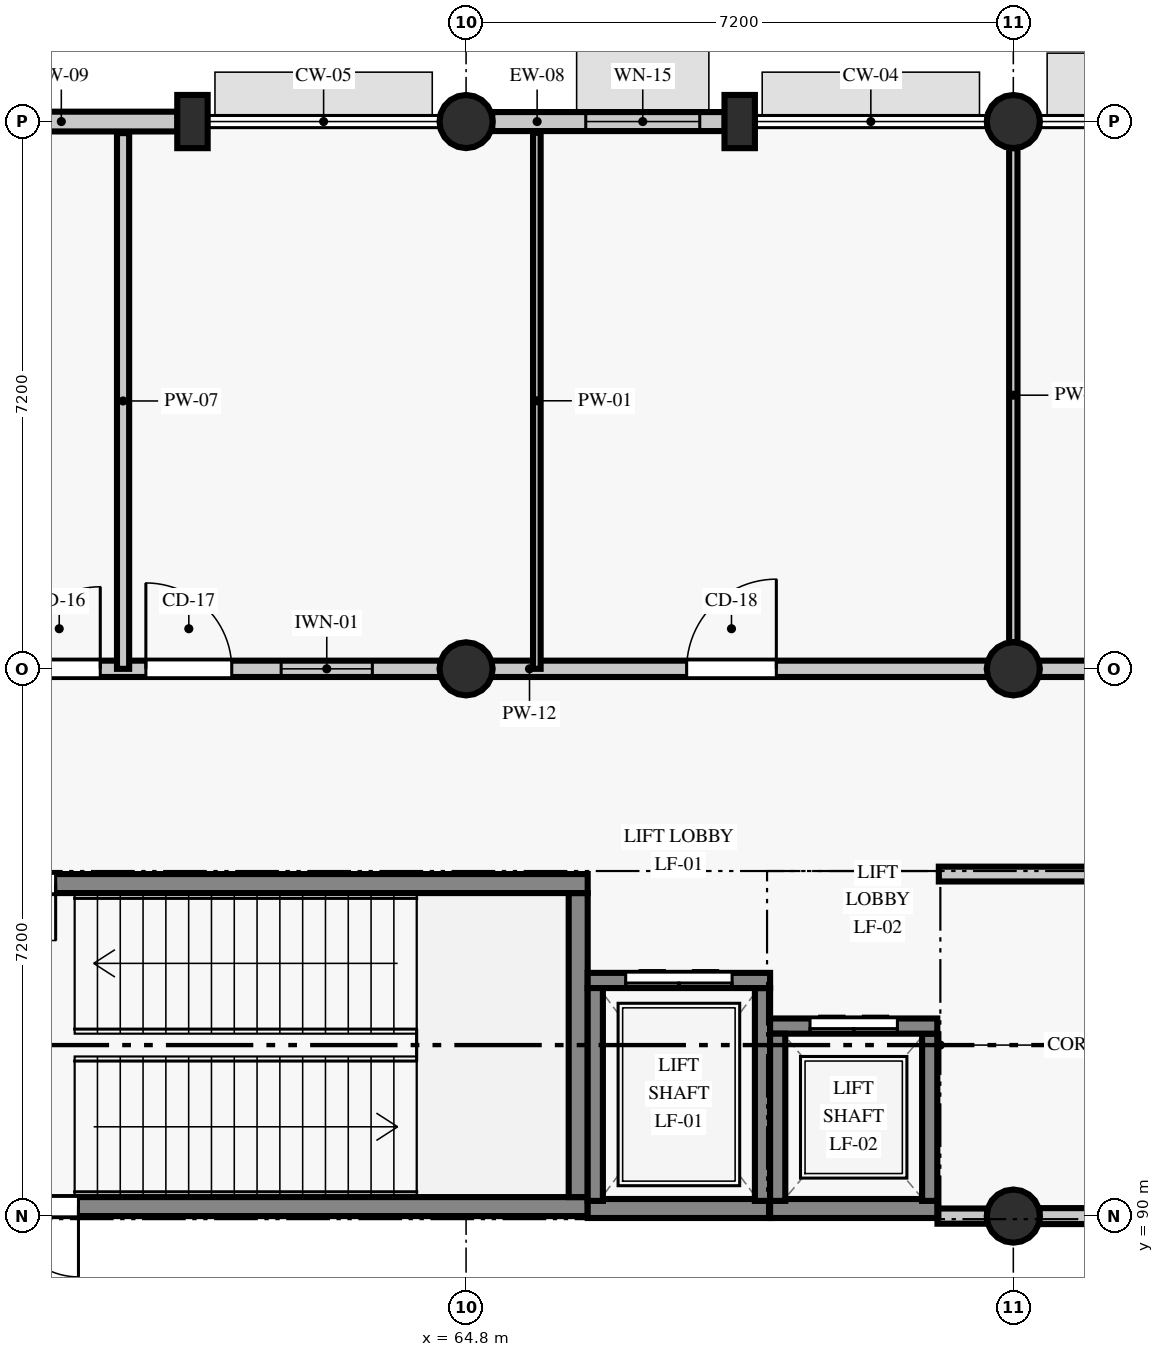
"""IFC4 building model, lengths in metres.
Left out: names, types, materials, properties, quantities, classifications, styles, units other than length and angle.
Written with IfcOpenShell. Run it as: python <this file> out.ifc"""

import sys

from ifc_helpers import new_model, si_unit, direction, frame, frame_2d, origin, origin_2d, place, context, subcontext, project, spatial, rectangle, circle, extrude, element, fill, save


model = new_model("IFC4")
c1 = context("Model", 3, precision=1e-05, world=origin(), true_north=direction((0.0, 1.0)))
c2 = subcontext(c1, "Body", "Model", "MODEL_VIEW")
j1 = project(units=[si_unit("LENGTHUNIT", "METRE"), si_unit("PLANEANGLEUNIT", "RADIAN")], contexts=[c1])
p1 = place(None, origin())
s1 = spatial("IfcSite", under=j1, at=p1, CompositionType="ELEMENT")
p2 = place(p1, origin())
s2 = spatial("IfcBuilding", under=s1, at=p2, CompositionType="ELEMENT")
p3 = place(p2, origin())
s3 = spatial("IfcBuildingStorey", under=s2, at=p3, CompositionType="ELEMENT", Elevation=0.0)
for number, where, z_axis, x_axis in (
    (1, (64.8, 97.2, 0.0), (0.0, 0.0, 1.0), (1.0, 0.0, 0.0)),
    (2, (64.8, 104.4, 0.0), (0.0, 0.0, 1.0), (1.0, 0.0, 0.0)),
    (3, (72.0, 90.0, 0.0), (0.0, 0.0, 1.0), (1.0, 0.0, 0.0)),
    (4, (72.0, 97.2, 0.0), (0.0, 0.0, 1.0), (1.0, 0.0, 0.0)),
    (5, (72.0, 104.4, 0.0), (0.0, 0.0, 1.0), (1.0, 0.0, 0.0)),
):
    element("IfcColumn", number, at=place(p3, frame(where, z_axis=z_axis, x_axis=x_axis)), inside=s3, PredefinedType="COLUMN", context=c2, shape_type="SweptSolid", body=[
        extrude(circle(Radius=0.35, at=origin_2d()), origin(), (0.0, 0.0, 1.0), 4.56),
    ])
for number, where, z_axis, x_axis in (
    (6, (61.2, 104.4, 0.0), (0.0, 0.0, 1.0), (1.0, 0.0, 0.0)),
    (7, (68.4, 104.4, 0.0), (0.0, 0.0, 1.0), (1.0, 0.0, 0.0)),
):
    element("IfcColumn", number, at=place(p3, frame(where, z_axis=z_axis, x_axis=x_axis)), inside=s3, PredefinedType="PILASTER", context=c2, shape_type="SweptSolid", body=[
        extrude(rectangle(XDim=0.4, YDim=0.7, at=origin_2d()), origin(), (0.0, 0.0, 1.0), 4.56),
    ])
p4 = place(p3, frame((71.002, 90.0, 0.0), z_axis=(0.0, 0.0, 1.0), x_axis=(1.0, 0.0, 0.0)))
e8 = element("IfcWall", 8, at=p4, inside=s3, PredefinedType="STANDARD", context=c2, shape_type="SweptSolid", body=[
    extrude(rectangle(XDim=0.653, YDim=0.2, at=frame_2d((0.327, 0.0))), origin(), (0.0, 0.0, 1.0), 4.56),
])
p5 = place(p3, frame((72.345, 90.0, 0.0), z_axis=(0.0, 0.0, 1.0), x_axis=(1.0, 0.0, 0.0)))
e9 = element("IfcWall", 9, at=p5, inside=s3, PredefinedType="STANDARD", context=c2, shape_type="SweptSolid", body=[
    extrude(rectangle(XDim=5.253, YDim=0.21, at=frame_2d((2.626, 0.0))), origin(), (0.0, 0.0, 1.0), 4.56),
])
p6 = place(p5, frame((2.076, 0.0, 0.9)))
e10 = element("IfcOpeningElement", 10, at=p6, cuts=e9, PredefinedType="OPENING", context=c2, shape_type="SweptSolid", body=[
    extrude(rectangle(XDim=1.1, YDim=1.42, at=frame_2d((0.55, 0.71))), frame((0.0, 0.115, 0.0), z_axis=(0.0, -1.0, 0.0), x_axis=(1.0, 0.0, 0.0)), (0.0, 0.0, 1.0), 0.23),
])
p7 = place(p3, frame((68.204, 104.4, 0.0), z_axis=(0.0, 0.0, 1.0), x_axis=(-1.0, 0.0, 0.0)))
e11 = element("IfcWall", 11, at=p7, inside=s3, PredefinedType="STANDARD", context=c2, shape_type="SweptSolid", body=[
    extrude(rectangle(XDim=3.059, YDim=0.25, at=frame_2d((1.53, 0.0))), origin(), (0.0, 0.0, 1.0), 2.9),
])
p8 = place(p7, frame((0.33, 0.0, 0.9)))
e12 = element("IfcOpeningElement", 12, at=p8, cuts=e11, PredefinedType="OPENING", context=c2, shape_type="SweptSolid", body=[
    extrude(rectangle(XDim=1.5, YDim=1.42, at=frame_2d((0.75, 0.71))), frame((0.0, 0.135, 0.0), z_axis=(0.0, -1.0, 0.0), x_axis=(1.0, 0.0, 0.0)), (0.0, 0.0, 1.0), 0.27),
])
p9 = place(p3, frame((61.004, 104.4, 0.0), z_axis=(0.0, 0.0, 1.0), x_axis=(-1.0, 0.0, 0.0)))
e13 = element("IfcWall", 13, at=p9, inside=s3, PredefinedType="STANDARD", context=c2, shape_type="SweptSolid", body=[
    extrude(rectangle(XDim=3.059, YDim=0.26, at=frame_2d((1.529, 0.0))), origin(), (0.0, 0.0, 1.0), 2.9),
])
p10 = place(p3, frame((57.6, 90.125, 0.0), z_axis=(0.0, 0.0, 1.0), x_axis=(1.0, 0.0, 0.0)))
e14 = element("IfcWall", 14, at=p10, inside=s3, PredefinedType="SHEAR", context=c2, shape_type="SweptSolid", body=[
    extrude(rectangle(XDim=8.8, YDim=0.25, at=frame_2d((4.4, 0.0))), origin(), (0.0, 0.0, 1.0), 4.56),
])
p11 = place(p10, frame((0.25, 0.0, 0.0)))
e15 = element("IfcOpeningElement", 15, at=p11, cuts=e14, PredefinedType="OPENING", context=c2, shape_type="SweptSolid", body=[
    extrude(rectangle(XDim=1.85, YDim=2.2, at=frame_2d((0.925, 1.1))), frame((0.0, 0.135, 0.0), z_axis=(0.0, -1.0, 0.0), x_axis=(1.0, 0.0, 0.0)), (0.0, 0.0, 1.0), 0.27),
])
p12 = place(p3, frame((66.275, 90.25, 0.0), z_axis=(0.0, 0.0, 1.0), x_axis=(0.0, 1.0, 0.0)))
e16 = element("IfcWall", 16, at=p12, inside=s3, PredefinedType="SHEAR", context=c2, shape_type="SweptSolid", body=[
    extrude(rectangle(XDim=4.0, YDim=0.25, at=frame_2d((2.0, 0.0))), origin(), (0.0, 0.0, 1.0), 4.56),
])
p13 = place(p3, frame((66.4, 94.375, 0.0), z_axis=(0.0, 0.0, 1.0), x_axis=(-1.0, 0.0, 0.0)))
e17 = element("IfcWall", 17, at=p13, inside=s3, PredefinedType="SHEAR", context=c2, shape_type="SweptSolid", body=[
    extrude(rectangle(XDim=8.8, YDim=0.25, at=frame_2d((4.4, 0.0))), origin(), (0.0, 0.0, 1.0), 4.56),
])
p14 = place(p13, frame((7.0, 0.0, 0.0)))
e18 = element("IfcOpeningElement", 18, at=p14, cuts=e17, PredefinedType="OPENING", context=c2, shape_type="SweptSolid", body=[
    extrude(rectangle(XDim=1.5, YDim=2.15, at=frame_2d((0.75, 1.075))), frame((0.0, 0.135, 0.0), z_axis=(0.0, -1.0, 0.0), x_axis=(1.0, 0.0, 0.0)), (0.0, 0.0, 1.0), 0.27),
])
p15 = place(p3, frame((66.4, 90.1, 0.0), z_axis=(0.0, 0.0, 1.0), x_axis=(1.0, 0.0, 0.0)))
e19 = element("IfcWall", 19, at=p15, inside=s3, PredefinedType="SHEAR", context=c2, shape_type="SweptSolid", body=[
    extrude(rectangle(XDim=2.4, YDim=0.25, at=frame_2d((1.2, 0.0))), origin(), (0.0, 0.0, 1.0), 4.56),
])
p16 = place(p3, frame((68.7, 90.2, 0.0), z_axis=(0.0, 0.0, 1.0), x_axis=(0.0, 1.0, 0.0)))
e20 = element("IfcWall", 20, at=p16, inside=s3, PredefinedType="SHEAR", context=c2, shape_type="SweptSolid", body=[
    extrude(rectangle(XDim=2.8, YDim=0.2, at=frame_2d((1.4, 0.0))), origin(), (0.0, 0.0, 1.0), 4.56),
])
p17 = place(p3, frame((68.8, 93.1, 0.0), z_axis=(0.0, 0.0, 1.0), x_axis=(-1.0, 0.0, 0.0)))
e21 = element("IfcWall", 21, at=p17, inside=s3, PredefinedType="SHEAR", context=c2, shape_type="SweptSolid", body=[
    extrude(rectangle(XDim=2.4, YDim=0.2, at=frame_2d((1.2, 0.0))), origin(), (0.0, 0.0, 1.0), 4.56),
])
p18 = place(p17, frame((0.5, 0.0, 0.0)))
e22 = element("IfcOpeningElement", 22, at=p18, cuts=e21, PredefinedType="OPENING", context=c2, shape_type="SweptSolid", body=[
    extrude(rectangle(XDim=1.4, YDim=2.15, at=frame_2d((0.7, 1.075))), frame((0.0, 0.11, 0.0), z_axis=(0.0, -1.0, 0.0), x_axis=(1.0, 0.0, 0.0)), (0.0, 0.0, 1.0), 0.22),
])
p19 = place(p3, frame((66.5, 93.0, 0.0), z_axis=(0.0, 0.0, 1.0), x_axis=(0.0, -1.0, 0.0)))
e23 = element("IfcWall", 23, at=p19, inside=s3, PredefinedType="SHEAR", context=c2, shape_type="SweptSolid", body=[
    extrude(rectangle(XDim=2.8, YDim=0.2, at=frame_2d((1.4, 0.0))), origin(), (0.0, 0.0, 1.0), 4.56),
])
p20 = place(p3, frame((68.8, 90.1, 0.0), z_axis=(0.0, 0.0, 1.0), x_axis=(1.0, 0.0, 0.0)))
e24 = element("IfcWall", 24, at=p20, inside=s3, PredefinedType="SHEAR", context=c2, shape_type="SweptSolid", body=[
    extrude(rectangle(XDim=2.2, YDim=0.25, at=frame_2d((1.1, 0.0))), origin(), (0.0, 0.0, 1.0), 4.56),
])
p21 = place(p3, frame((70.9, 90.2, 0.0), z_axis=(0.0, 0.0, 1.0), x_axis=(0.0, 1.0, 0.0)))
e25 = element("IfcWall", 25, at=p21, inside=s3, PredefinedType="SHEAR", context=c2, shape_type="SweptSolid", body=[
    extrude(rectangle(XDim=2.2, YDim=0.2, at=frame_2d((1.1, 0.0))), origin(), (0.0, 0.0, 1.0), 4.56),
])
p22 = place(p3, frame((71.0, 92.5, 0.0), z_axis=(0.0, 0.0, 1.0), x_axis=(-1.0, 0.0, 0.0)))
e26 = element("IfcWall", 26, at=p22, inside=s3, PredefinedType="SHEAR", context=c2, shape_type="SweptSolid", body=[
    extrude(rectangle(XDim=2.2, YDim=0.2, at=frame_2d((1.1, 0.0))), origin(), (0.0, 0.0, 1.0), 4.56),
])
p23 = place(p22, frame((0.525, 0.0, 0.0)))
e27 = element("IfcOpeningElement", 27, at=p23, cuts=e26, PredefinedType="OPENING", context=c2, shape_type="SweptSolid", body=[
    extrude(rectangle(XDim=1.15, YDim=2.15, at=frame_2d((0.575, 1.075))), frame((0.0, 0.11, 0.0), z_axis=(0.0, -1.0, 0.0), x_axis=(1.0, 0.0, 0.0)), (0.0, 0.0, 1.0), 0.22),
])
p24 = place(p3, frame((68.9, 92.4, 0.0), z_axis=(0.0, 0.0, 1.0), x_axis=(0.0, -1.0, 0.0)))
e28 = element("IfcWall", 28, at=p24, inside=s3, PredefinedType="SHEAR", context=c2, shape_type="SweptSolid", body=[
    extrude(rectangle(XDim=2.2, YDim=0.2, at=frame_2d((1.1, 0.0))), origin(), (0.0, 0.0, 1.0), 4.56),
])
p25 = place(p3, frame((50.75, 97.2, 0.0), z_axis=(0.0, 0.0, 1.0), x_axis=(1.0, 0.0, 0.0)))
e29 = element("IfcWall", 29, at=p25, inside=s3, PredefinedType="PARTITIONING", context=c2, shape_type="SweptSolid", body=[
    extrude(rectangle(XDim=35.3, YDim=0.215, at=frame_2d((17.65, 0.0))), origin(), (0.0, 0.0, 1.0), 3.81),
])
p26 = place(p25, frame((2.438, 0.0, 0.0)))
e30 = element("IfcOpeningElement", 30, at=p26, cuts=e29, PredefinedType="OPENING", context=c2, shape_type="SweptSolid", body=[
    extrude(rectangle(XDim=1.03, YDim=2.18, at=frame_2d((0.515, 1.09))), frame((0.0, 0.117, 0.0), z_axis=(0.0, -1.0, 0.0), x_axis=(1.0, 0.0, 0.0)), (0.0, 0.0, 1.0), 0.235),
])
p27 = place(p25, frame((4.118, 0.0, 1.05)))
e31 = element("IfcOpeningElement", 31, at=p27, cuts=e29, PredefinedType="OPENING", context=c2, shape_type="SweptSolid", body=[
    extrude(rectangle(XDim=1.5, YDim=1.1, at=frame_2d((0.75, 0.55))), frame((0.0, 0.117, 0.0), z_axis=(0.0, -1.0, 0.0), x_axis=(1.0, 0.0, 0.0)), (0.0, 0.0, 1.0), 0.235),
])
p28 = place(p25, frame((8.157, 0.0, 0.0)))
e32 = element("IfcOpeningElement", 32, at=p28, cuts=e29, PredefinedType="OPENING", context=c2, shape_type="SweptSolid", body=[
    extrude(rectangle(XDim=1.08, YDim=2.18, at=frame_2d((0.54, 1.09))), frame((0.0, 0.117, 0.0), z_axis=(0.0, -1.0, 0.0), x_axis=(1.0, 0.0, 0.0)), (0.0, 0.0, 1.0), 0.235),
])
p29 = place(p25, frame((9.837, 0.0, 0.0)))
e33 = element("IfcOpeningElement", 33, at=p29, cuts=e29, PredefinedType="OPENING", context=c2, shape_type="SweptSolid", body=[
    extrude(rectangle(XDim=1.13, YDim=2.18, at=frame_2d((0.565, 1.09))), frame((0.0, 0.117, 0.0), z_axis=(0.0, -1.0, 0.0), x_axis=(1.0, 0.0, 0.0)), (0.0, 0.0, 1.0), 0.235),
])
p30 = place(p25, frame((11.617, 0.0, 1.05)))
e34 = element("IfcOpeningElement", 34, at=p30, cuts=e29, PredefinedType="OPENING", context=c2, shape_type="SweptSolid", body=[
    extrude(rectangle(XDim=1.2, YDim=1.1, at=frame_2d((0.6, 0.55))), frame((0.0, 0.117, 0.0), z_axis=(0.0, -1.0, 0.0), x_axis=(1.0, 0.0, 0.0)), (0.0, 0.0, 1.0), 0.235),
])
p31 = place(p25, frame((16.952, 0.0, 0.0)))
e35 = element("IfcOpeningElement", 35, at=p31, cuts=e29, PredefinedType="OPENING", context=c2, shape_type="SweptSolid", body=[
    extrude(rectangle(XDim=1.18, YDim=2.18, at=frame_2d((0.59, 1.09))), frame((0.0, 0.117, 0.0), z_axis=(0.0, -1.0, 0.0), x_axis=(1.0, 0.0, 0.0)), (0.0, 0.0, 1.0), 0.235),
])
p32 = place(p25, frame((22.23, 0.0, 0.0)))
e36 = element("IfcOpeningElement", 36, at=p32, cuts=e29, PredefinedType="OPENING", context=c2, shape_type="SweptSolid", body=[
    extrude(rectangle(XDim=0.92, YDim=2.18, at=frame_2d((0.46, 1.09))), frame((0.0, 0.117, 0.0), z_axis=(0.0, -1.0, 0.0), x_axis=(1.0, 0.0, 0.0)), (0.0, 0.0, 1.0), 0.235),
])
p33 = place(p25, frame((24.43, 0.0, 0.0)))
e37 = element("IfcOpeningElement", 37, at=p33, cuts=e29, PredefinedType="OPENING", context=c2, shape_type="SweptSolid", body=[
    extrude(rectangle(XDim=0.94, YDim=2.08, at=frame_2d((0.47, 1.04))), frame((0.0, 0.117, 0.0), z_axis=(0.0, -1.0, 0.0), x_axis=(1.0, 0.0, 0.0)), (0.0, 0.0, 1.0), 0.235),
])
p34 = place(p25, frame((26.72, 0.0, 0.0)))
e38 = element("IfcOpeningElement", 38, at=p34, cuts=e29, PredefinedType="OPENING", context=c2, shape_type="SweptSolid", body=[
    extrude(rectangle(XDim=0.9, YDim=2.08, at=frame_2d((0.45, 1.04))), frame((0.0, 0.117, 0.0), z_axis=(0.0, -1.0, 0.0), x_axis=(1.0, 0.0, 0.0)), (0.0, 0.0, 1.0), 0.235),
])
p35 = place(p25, frame((31.408, 0.0, 0.0)))
e39 = element("IfcOpeningElement", 39, at=p35, cuts=e29, PredefinedType="OPENING", context=c2, shape_type="SweptSolid", body=[
    extrude(rectangle(XDim=1.2, YDim=2.23, at=frame_2d((0.6, 1.115))), frame((0.0, 0.117, 0.0), z_axis=(0.0, -1.0, 0.0), x_axis=(1.0, 0.0, 0.0)), (0.0, 0.0, 1.0), 0.235),
])
p36 = place(p3, frame((60.287, 97.2, 0.0), z_axis=(0.0, 0.0, 1.0), x_axis=(0.0, 1.0, 0.0)))
e40 = element("IfcWall", 40, at=p36, inside=s3, PredefinedType="PARTITIONING", context=c2, shape_type="SweptSolid", body=[
    extrude(rectangle(XDim=7.048, YDim=0.16, at=frame_2d((3.524, 0.0))), origin(), (0.0, 0.0, 1.0), 3.81),
])
p37 = place(p3, frame((65.731, 97.2, 0.0), z_axis=(0.0, 0.0, 1.0), x_axis=(0.0, 1.0, 0.0)))
e41 = element("IfcWall", 41, at=p37, inside=s3, PredefinedType="PARTITIONING", context=c2, shape_type="SweptSolid", body=[
    extrude(rectangle(XDim=7.053, YDim=0.1, at=frame_2d((3.526, 0.0))), origin(), (0.0, 0.0, 1.0), 3.81),
])
p38 = place(p3, frame((72.0, 97.55, 0.0), z_axis=(0.0, 0.0, 1.0), x_axis=(0.0, 1.0, 0.0)))
e42 = element("IfcWall", 42, at=p38, inside=s3, PredefinedType="PARTITIONING", context=c2, shape_type="SweptSolid", body=[
    extrude(rectangle(XDim=6.5, YDim=0.11, at=frame_2d((3.25, 0.0))), origin(), (0.0, 0.0, 1.0), 4.01),
])
p39 = place(p3, frame((71.02, 94.5, 0.0), z_axis=(0.0, 0.0, 1.0), x_axis=(1.0, 0.0, 0.0)))
e43 = element("IfcWall", 43, at=p39, inside=s3, PredefinedType="PARTITIONING", context=c2, shape_type="SweptSolid", body=[
    extrude(rectangle(XDim=6.56, YDim=0.195, at=frame_2d((3.28, 0.0))), origin(), (0.0, 0.0, 1.0), 4.01),
])
p40 = place(p39, frame((4.01, 0.0, 0.0)))
e44 = element("IfcOpeningElement", 44, at=p40, cuts=e43, PredefinedType="OPENING", context=c2, shape_type="SweptSolid", body=[
    extrude(rectangle(XDim=1.02, YDim=2.08, at=frame_2d((0.51, 1.04))), frame((0.0, 0.107, 0.0), z_axis=(0.0, -1.0, 0.0), x_axis=(1.0, 0.0, 0.0)), (0.0, 0.0, 1.0), 0.215),
])
p41 = place(p8, origin())
e45 = element("IfcWindow", 45, at=p41, inside=s3, PartitioningType="SINGLE_PANEL", PredefinedType="WINDOW", context=c2, shape_type="SweptSolid", body=[
    extrude(rectangle(XDim=1.5, YDim=1.42, at=frame_2d((0.75, 0.71))), frame((0.0, 0.03, 0.0), z_axis=(0.0, -1.0, 0.0), x_axis=(1.0, 0.0, 0.0)), (0.0, 0.0, 1.0), 0.06),
])
fill(e12, e45)
p42 = place(p11, frame((1.85, 0.0, 0.0), z_axis=(0.0, 0.0, 1.0), x_axis=(-1.0, 0.0, 0.0)))
e46 = element("IfcDoor", 46, at=p42, inside=s3, OperationType="DOUBLE_DOOR_SINGLE_SWING", PredefinedType="DOOR", context=c2, shape_type="SweptSolid", body=[
    extrude(rectangle(XDim=1.85, YDim=2.2, at=frame_2d((0.925, 1.1))), frame((0.0, 0.025, 0.0), z_axis=(0.0, -1.0, 0.0), x_axis=(1.0, 0.0, 0.0)), (0.0, 0.0, 1.0), 0.05),
])
fill(e15, e46)
p43 = place(p14, origin())
e47 = element("IfcDoor", 47, at=p43, inside=s3, OperationType="DOUBLE_DOOR_SINGLE_SWING", PredefinedType="DOOR", context=c2, shape_type="SweptSolid", body=[
    extrude(rectangle(XDim=1.5, YDim=2.15, at=frame_2d((0.75, 1.075))), frame((0.0, 0.025, 0.0), z_axis=(0.0, -1.0, 0.0), x_axis=(1.0, 0.0, 0.0)), (0.0, 0.0, 1.0), 0.05),
])
fill(e18, e47)
p44 = place(p18, frame((1.4, 0.0, 0.0), z_axis=(0.0, 0.0, 1.0), x_axis=(-1.0, 0.0, 0.0)))
e48 = element("IfcDoor", 48, at=p44, inside=s3, OperationType="DOUBLE_DOOR_SLIDING", PredefinedType="DOOR", context=c2, shape_type="SweptSolid", body=[
    extrude(rectangle(XDim=1.4, YDim=2.15, at=frame_2d((0.7, 1.075))), frame((0.0, 0.025, 0.0), z_axis=(0.0, -1.0, 0.0), x_axis=(1.0, 0.0, 0.0)), (0.0, 0.0, 1.0), 0.05),
])
fill(e22, e48)
p45 = place(p23, frame((1.15, 0.0, 0.0), z_axis=(0.0, 0.0, 1.0), x_axis=(-1.0, 0.0, 0.0)))
e49 = element("IfcDoor", 49, at=p45, inside=s3, OperationType="DOUBLE_DOOR_SLIDING", PredefinedType="DOOR", context=c2, shape_type="SweptSolid", body=[
    extrude(rectangle(XDim=1.15, YDim=2.15, at=frame_2d((0.575, 1.075))), frame((0.0, 0.025, 0.0), z_axis=(0.0, -1.0, 0.0), x_axis=(1.0, 0.0, 0.0)), (0.0, 0.0, 1.0), 0.05),
])
fill(e27, e49)
p46 = place(p28, origin())
e50 = element("IfcDoor", 50, at=p46, inside=s3, OperationType="SINGLE_SWING_RIGHT", PredefinedType="DOOR", context=c2, shape_type="SweptSolid", body=[
    extrude(rectangle(XDim=1.08, YDim=2.18, at=frame_2d((0.54, 1.09))), frame((0.0, 0.025, 0.0), z_axis=(0.0, -1.0, 0.0), x_axis=(1.0, 0.0, 0.0)), (0.0, 0.0, 1.0), 0.05),
])
fill(e32, e50)
p47 = place(p29, origin())
e51 = element("IfcDoor", 51, at=p47, inside=s3, OperationType="SINGLE_SWING_LEFT", PredefinedType="DOOR", context=c2, shape_type="SweptSolid", body=[
    extrude(rectangle(XDim=1.13, YDim=2.18, at=frame_2d((0.565, 1.09))), frame((0.0, 0.025, 0.0), z_axis=(0.0, -1.0, 0.0), x_axis=(1.0, 0.0, 0.0)), (0.0, 0.0, 1.0), 0.05),
])
fill(e33, e51)
p48 = place(p30, origin())
e52 = element("IfcWindow", 52, at=p48, inside=s3, PartitioningType="SINGLE_PANEL", PredefinedType="WINDOW", context=c2, shape_type="SweptSolid", body=[
    extrude(rectangle(XDim=1.2, YDim=1.1, at=frame_2d((0.6, 0.55))), frame((0.0, 0.03, 0.0), z_axis=(0.0, -1.0, 0.0), x_axis=(1.0, 0.0, 0.0)), (0.0, 0.0, 1.0), 0.06),
])
fill(e34, e52)
p49 = place(p31, origin())
e53 = element("IfcDoor", 53, at=p49, inside=s3, OperationType="SINGLE_SWING_RIGHT", PredefinedType="DOOR", context=c2, shape_type="SweptSolid", body=[
    extrude(rectangle(XDim=1.18, YDim=2.18, at=frame_2d((0.59, 1.09))), frame((0.0, 0.025, 0.0), z_axis=(0.0, -1.0, 0.0), x_axis=(1.0, 0.0, 0.0)), (0.0, 0.0, 1.0), 0.05),
])
fill(e35, e53)
save(model, sys.argv[1])
